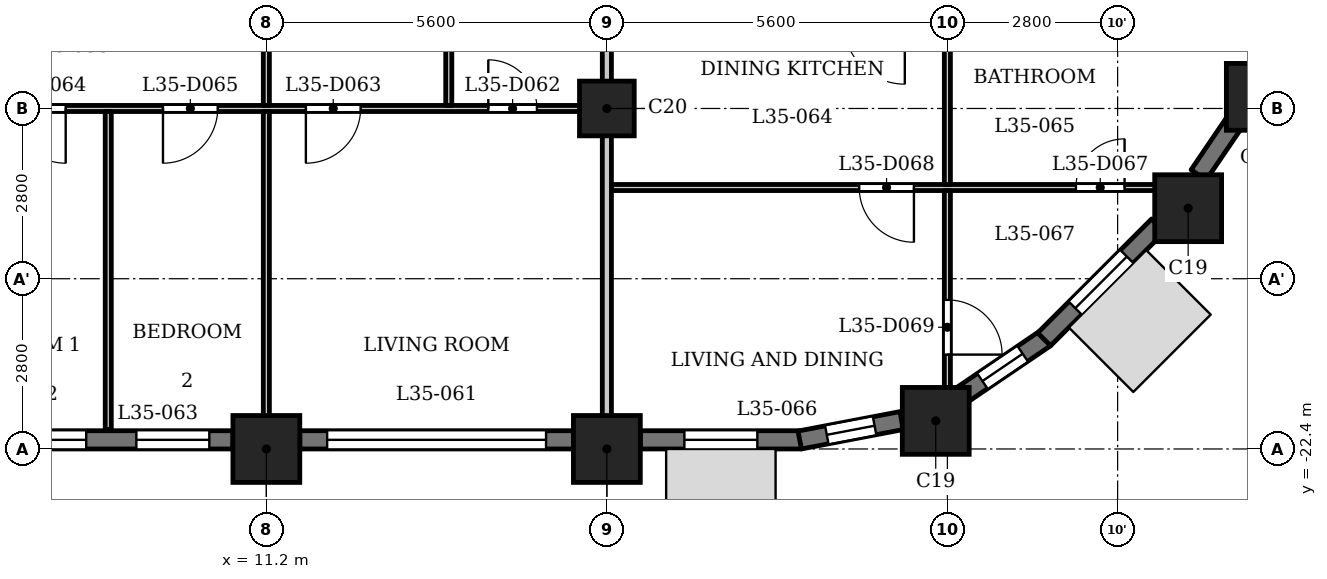
"""IFC4 building model, lengths in metres.
Left out: names, types, materials, properties, quantities, classifications, styles, units other than length and angle.
Written with IfcOpenShell. Run it as: python <this file> out.ifc"""

import sys

from ifc_helpers import new_model, si_unit, direction, frame, frame_2d, origin, origin_2d, place, context, subcontext, project, spatial, rectangle, extrude, element, fill, save


model = new_model("IFC4")
c1 = context("Model", 3, precision=1e-05, world=origin(), true_north=direction((0.0, 1.0)))
c2 = subcontext(c1, "Body", "Model", "MODEL_VIEW")
j1 = project(units=[si_unit("LENGTHUNIT", "METRE"), si_unit("PLANEANGLEUNIT", "RADIAN")], contexts=[c1])
p1 = place(None, origin())
s1 = spatial("IfcSite", under=j1, at=p1, CompositionType="ELEMENT")
p2 = place(p1, origin())
s2 = spatial("IfcBuilding", under=s1, at=p2, CompositionType="ELEMENT")
p3 = place(p2, frame((0.0, 0.0, 139.6)))
s3 = spatial("IfcBuildingStorey", under=s2, at=p3, CompositionType="ELEMENT", Elevation=139.6)
for number, where, z_axis, x_axis in (
    (1, (11.2, -22.4, 0.0), (0.0, 0.0, 1.0), (1.0, 0.0, 0.0)),
    (2, (16.8, -22.4, 0.0), (0.0, 0.0, 1.0), (1.0, 0.0, 0.0)),
    (3, (22.209, -21.938, 0.0), (0.0, 0.0, 1.0), (1.0, 0.0, 0.0)),
    (4, (26.36, -18.44, 0.0), (0.0, 0.0, 1.0), (1.0, 0.0, 0.0)),
    (5, (27.538, -16.609, 0.0), (0.0, 0.0, 1.0), (1.0, 0.0, 0.0)),
):
    element("IfcColumn", number, at=place(p3, frame(where, z_axis=z_axis, x_axis=x_axis)), inside=s3, PredefinedType="COLUMN", context=c2, shape_type="SweptSolid", body=[
        extrude(rectangle(XDim=1.1, YDim=1.1, at=origin_2d()), origin(), (0.0, 0.0, 1.0), 3.5),
    ])
p4 = place(p3, frame((16.8, -16.8, 0.0), z_axis=(0.0, 0.0, 1.0), x_axis=(1.0, 0.0, 0.0)))
e6 = element("IfcColumn", 6, at=p4, inside=s3, PredefinedType="COLUMN", context=c2, shape_type="SweptSolid", body=[
    extrude(rectangle(XDim=0.9, YDim=0.9, at=origin_2d()), origin(), (0.0, 0.0, 1.0), 3.5),
])
p5 = place(p3, frame((6.15, -22.25, 0.0), z_axis=(0.0, 0.0, 1.0), x_axis=(1.0, 0.0, 0.0)))
e7 = element("IfcWall", 7, at=p5, inside=s3, PredefinedType="SOLIDWALL", context=c2, shape_type="SweptSolid", body=[
    extrude(rectangle(XDim=4.5, YDim=0.3, at=frame_2d((2.25, 0.0))), origin(), (0.0, 0.0, 1.0), 2.45),
])
p6 = place(p5, frame((0.288, 0.0, 0.9)))
e8 = element("IfcOpeningElement", 8, at=p6, cuts=e7, PredefinedType="OPENING", context=c2, shape_type="SweptSolid", body=[
    extrude(rectangle(XDim=1.8, YDim=1.25, at=frame_2d((0.9, 0.625))), frame((0.0, 0.16, 0.0), z_axis=(0.0, -1.0, 0.0), x_axis=(1.0, 0.0, 0.0)), (0.0, 0.0, 1.0), 0.32),
])
p7 = place(p5, frame((2.913, 0.0, 0.6)))
e9 = element("IfcOpeningElement", 9, at=p7, cuts=e7, PredefinedType="OPENING", context=c2, shape_type="SweptSolid", body=[
    extrude(rectangle(XDim=1.2, YDim=1.55, at=frame_2d((0.6, 0.775))), frame((0.0, 0.16, 0.0), z_axis=(0.0, -1.0, 0.0), x_axis=(1.0, 0.0, 0.0)), (0.0, 0.0, 1.0), 0.32),
])
p8 = place(p3, frame((11.75, -22.25, 0.0), z_axis=(0.0, 0.0, 1.0), x_axis=(1.0, 0.0, 0.0)))
e10 = element("IfcWall", 10, at=p8, inside=s3, PredefinedType="SOLIDWALL", context=c2, shape_type="SweptSolid", body=[
    extrude(rectangle(XDim=4.5, YDim=0.3, at=frame_2d((2.25, 0.0))), origin(), (0.0, 0.0, 1.0), 2.45),
])
p9 = place(p8, frame((0.45, 0.0, 1.2)))
e11 = element("IfcOpeningElement", 11, at=p9, cuts=e10, PredefinedType="OPENING", context=c2, shape_type="SweptSolid", body=[
    extrude(rectangle(XDim=3.6, YDim=0.95, at=frame_2d((1.8, 0.475))), frame((0.0, 0.16, 0.0), z_axis=(0.0, -1.0, 0.0), x_axis=(1.0, 0.0, 0.0)), (0.0, 0.0, 1.0), 0.32),
])
p10 = place(p3, frame((17.35, -22.25, 0.0), z_axis=(0.0, 0.0, 1.0), x_axis=(1.0, 0.0, 0.0)))
e12 = element("IfcWall", 12, at=p10, inside=s3, PredefinedType="SOLIDWALL", context=c2, shape_type="SweptSolid", body=[
    extrude(rectangle(XDim=2.65, YDim=0.3, at=frame_2d((1.325, 0.0))), origin(), (0.0, 0.0, 1.0), 2.45),
])
p11 = place(p10, frame((0.725, 0.0, 0.6)))
e13 = element("IfcOpeningElement", 13, at=p11, cuts=e12, PredefinedType="OPENING", context=c2, shape_type="SweptSolid", body=[
    extrude(rectangle(XDim=1.2, YDim=1.55, at=frame_2d((0.6, 0.775))), frame((0.0, 0.16, 0.0), z_axis=(0.0, -1.0, 0.0), x_axis=(1.0, 0.0, 0.0)), (0.0, 0.0, 1.0), 0.32),
])
p12 = place(p3, frame((19.972, -22.253, 0.0), z_axis=(0.0, 0.0, 1.0), x_axis=(0.982297206936, 0.187329114784, 0.0)))
e14 = element("IfcWall", 14, at=p12, inside=s3, PredefinedType="SOLIDWALL", context=c2, shape_type="SweptSolid", body=[
    extrude(rectangle(XDim=1.706, YDim=0.3, at=frame_2d((0.853, 0.0))), origin(), (0.0, 0.0, 1.0), 2.45),
])
p13 = place(p12, frame((0.453, 0.0, 0.6)))
e15 = element("IfcOpeningElement", 15, at=p13, cuts=e14, PredefinedType="OPENING", context=c2, shape_type="SweptSolid", body=[
    extrude(rectangle(XDim=0.8, YDim=1.55, at=frame_2d((0.4, 0.775))), frame((0.0, 0.16, 0.0), z_axis=(0.0, -1.0, 0.0), x_axis=(1.0, 0.0, 0.0)), (0.0, 0.0, 1.0), 0.32),
])
p14 = place(p3, frame((22.602, -21.538, 0.0), z_axis=(0.0, 0.0, 1.0), x_axis=(0.827040942766, 0.562141689424, 0.0)))
e16 = element("IfcWall", 16, at=p14, inside=s3, PredefinedType="SOLIDWALL", context=c2, shape_type="SweptSolid", body=[
    extrude(rectangle(XDim=1.706, YDim=0.3, at=frame_2d((0.853, 0.0))), origin(), (0.0, 0.0, 1.0), 2.45),
])
p15 = place(p14, frame((0.453, 0.0, 0.6)))
e17 = element("IfcOpeningElement", 17, at=p15, cuts=e16, PredefinedType="OPENING", context=c2, shape_type="SweptSolid", body=[
    extrude(rectangle(XDim=0.8, YDim=1.55, at=frame_2d((0.4, 0.775))), frame((0.0, 0.16, 0.0), z_axis=(0.0, -1.0, 0.0), x_axis=(1.0, 0.0, 0.0)), (0.0, 0.0, 1.0), 0.32),
])
p16 = place(p3, frame((23.991, -20.597, 0.0), z_axis=(0.0, 0.0, 1.0), x_axis=(0.707106781187, 0.707106781187, 0.0)))
e18 = element("IfcWall", 18, at=p16, inside=s3, PredefinedType="SOLIDWALL", context=c2, shape_type="SweptSolid", body=[
    extrude(rectangle(XDim=2.65, YDim=0.3, at=frame_2d((1.325, 0.0))), origin(), (0.0, 0.0, 1.0), 2.45),
])
p17 = place(p16, frame((0.725, 0.0, 0.6)))
e19 = element("IfcOpeningElement", 19, at=p17, cuts=e18, PredefinedType="OPENING", context=c2, shape_type="SweptSolid", body=[
    extrude(rectangle(XDim=1.2, YDim=1.55, at=frame_2d((0.6, 0.775))), frame((0.0, 0.16, 0.0), z_axis=(0.0, -1.0, 0.0), x_axis=(1.0, 0.0, 0.0)), (0.0, 0.0, 1.0), 0.32),
])
p18 = place(p3, frame((26.532, -17.893, 0.0), z_axis=(0.0, 0.0, 1.0), x_axis=(0.562105419172, 0.82706559458, 0.0)))
e20 = element("IfcWall", 20, at=p18, inside=s3, PredefinedType="SOLIDWALL", context=c2, shape_type="SweptSolid", body=[
    extrude(rectangle(XDim=1.077, YDim=0.3, at=frame_2d((0.539, 0.0))), origin(), (0.0, 0.0, 1.0), 3.2),
])
p19 = place(p3, frame((16.875, -18.1, 0.0), z_axis=(0.0, 0.0, 1.0), x_axis=(1.0, 0.0, 0.0)))
e21 = element("IfcWall", 21, at=p19, inside=s3, PredefinedType="PARTITIONING", context=c2, shape_type="SweptSolid", body=[
    extrude(rectangle(XDim=9.565, YDim=0.1, at=frame_2d((4.782, 0.0))), origin(), (0.0, 0.0, 1.0), 3.2),
])
p20 = place(p19, frame((7.639, 0.0, 0.0)))
e22 = element("IfcOpeningElement", 22, at=p20, cuts=e21, PredefinedType="OPENING", context=c2, shape_type="SweptSolid", body=[
    extrude(rectangle(XDim=0.8, YDim=2.1, at=frame_2d((0.4, 1.05))), frame((0.0, 0.06, 0.0), z_axis=(0.0, -1.0, 0.0), x_axis=(1.0, 0.0, 0.0)), (0.0, 0.0, 1.0), 0.12),
])
p21 = place(p19, frame((4.075, 0.0, 0.0)))
e23 = element("IfcOpeningElement", 23, at=p21, cuts=e21, PredefinedType="OPENING", context=c2, shape_type="SweptSolid", body=[
    extrude(rectangle(XDim=0.9, YDim=2.1, at=frame_2d((0.45, 1.05))), frame((0.0, 0.06, 0.0), z_axis=(0.0, -1.0, 0.0), x_axis=(1.0, 0.0, 0.0)), (0.0, 0.0, 1.0), 0.12),
])
p22 = place(p3, frame((-16.725, -16.8, 0.0), z_axis=(0.0, 0.0, 1.0), x_axis=(1.0, 0.0, 0.0)))
e24 = element("IfcWall", 24, at=p22, inside=s3, PredefinedType="PARTITIONING", context=c2, shape_type="SweptSolid", body=[
    extrude(rectangle(XDim=33.45, YDim=0.1, at=frame_2d((16.725, 0.0))), origin(), (0.0, 0.0, 1.0), 3.2),
])
p23 = place(p22, frame((0.575, 0.0, 0.0)))
e25 = element("IfcOpeningElement", 25, at=p23, cuts=e24, PredefinedType="OPENING", context=c2, shape_type="SweptSolid", body=[
    extrude(rectangle(XDim=0.8, YDim=2.1, at=frame_2d((0.4, 1.05))), frame((0.0, 0.06, 0.0), z_axis=(0.0, -1.0, 0.0), x_axis=(1.0, 0.0, 0.0)), (0.0, 0.0, 1.0), 0.12),
])
p24 = place(p22, frame((6.175, 0.0, 0.0)))
e26 = element("IfcOpeningElement", 26, at=p24, cuts=e24, PredefinedType="OPENING", context=c2, shape_type="SweptSolid", body=[
    extrude(rectangle(XDim=0.9, YDim=2.1, at=frame_2d((0.45, 1.05))), frame((0.0, 0.06, 0.0), z_axis=(0.0, -1.0, 0.0), x_axis=(1.0, 0.0, 0.0)), (0.0, 0.0, 1.0), 0.12),
])
p25 = place(p22, frame((15.275, 0.0, 0.0)))
e27 = element("IfcOpeningElement", 27, at=p25, cuts=e24, PredefinedType="OPENING", context=c2, shape_type="SweptSolid", body=[
    extrude(rectangle(XDim=0.8, YDim=2.1, at=frame_2d((0.4, 1.05))), frame((0.0, 0.06, 0.0), z_axis=(0.0, -1.0, 0.0), x_axis=(1.0, 0.0, 0.0)), (0.0, 0.0, 1.0), 0.12),
])
p26 = place(p22, frame((11.775, 0.0, 0.0)))
e28 = element("IfcOpeningElement", 28, at=p26, cuts=e24, PredefinedType="OPENING", context=c2, shape_type="SweptSolid", body=[
    extrude(rectangle(XDim=0.9, YDim=2.1, at=frame_2d((0.45, 1.05))), frame((0.0, 0.06, 0.0), z_axis=(0.0, -1.0, 0.0), x_axis=(1.0, 0.0, 0.0)), (0.0, 0.0, 1.0), 0.12),
])
p27 = place(p22, frame((17.275, 0.0, 0.0)))
e29 = element("IfcOpeningElement", 29, at=p27, cuts=e24, PredefinedType="OPENING", context=c2, shape_type="SweptSolid", body=[
    extrude(rectangle(XDim=0.8, YDim=2.1, at=frame_2d((0.4, 1.05))), frame((0.0, 0.06, 0.0), z_axis=(0.0, -1.0, 0.0), x_axis=(1.0, 0.0, 0.0)), (0.0, 0.0, 1.0), 0.12),
])
p28 = place(p22, frame((20.775, 0.0, 0.0)))
e30 = element("IfcOpeningElement", 30, at=p28, cuts=e24, PredefinedType="OPENING", context=c2, shape_type="SweptSolid", body=[
    extrude(rectangle(XDim=0.9, YDim=2.1, at=frame_2d((0.45, 1.05))), frame((0.0, 0.06, 0.0), z_axis=(0.0, -1.0, 0.0), x_axis=(1.0, 0.0, 0.0)), (0.0, 0.0, 1.0), 0.12),
])
p29 = place(p22, frame((31.575, 0.0, 0.0)))
e31 = element("IfcOpeningElement", 31, at=p29, cuts=e24, PredefinedType="OPENING", context=c2, shape_type="SweptSolid", body=[
    extrude(rectangle(XDim=0.8, YDim=2.1, at=frame_2d((0.4, 1.05))), frame((0.0, 0.06, 0.0), z_axis=(0.0, -1.0, 0.0), x_axis=(1.0, 0.0, 0.0)), (0.0, 0.0, 1.0), 0.12),
])
p30 = place(p22, frame((28.575, 0.0, 0.0)))
e32 = element("IfcOpeningElement", 32, at=p30, cuts=e24, PredefinedType="OPENING", context=c2, shape_type="SweptSolid", body=[
    extrude(rectangle(XDim=0.9, YDim=2.1, at=frame_2d((0.45, 1.05))), frame((0.0, 0.06, 0.0), z_axis=(0.0, -1.0, 0.0), x_axis=(1.0, 0.0, 0.0)), (0.0, 0.0, 1.0), 0.12),
])
p31 = place(p22, frame((23.725, 0.0, 0.0)))
e33 = element("IfcOpeningElement", 33, at=p31, cuts=e24, PredefinedType="OPENING", context=c2, shape_type="SweptSolid", body=[
    extrude(rectangle(XDim=0.9, YDim=2.1, at=frame_2d((0.45, 1.05))), frame((0.0, 0.06, 0.0), z_axis=(0.0, -1.0, 0.0), x_axis=(1.0, 0.0, 0.0)), (0.0, 0.0, 1.0), 0.12),
])
p32 = place(p22, frame((26.225, 0.0, 0.0)))
e34 = element("IfcOpeningElement", 34, at=p32, cuts=e24, PredefinedType="OPENING", context=c2, shape_type="SweptSolid", body=[
    extrude(rectangle(XDim=0.9, YDim=2.1, at=frame_2d((0.45, 1.05))), frame((0.0, 0.06, 0.0), z_axis=(0.0, -1.0, 0.0), x_axis=(1.0, 0.0, 0.0)), (0.0, 0.0, 1.0), 0.12),
])
p33 = place(p3, frame((8.6, -22.08, 0.0), z_axis=(0.0, 0.0, 1.0), x_axis=(0.0, 1.0, 0.0)))
e35 = element("IfcWall", 35, at=p33, inside=s3, PredefinedType="PARTITIONING", context=c2, shape_type="SweptSolid", body=[
    extrude(rectangle(XDim=5.23, YDim=0.1, at=frame_2d((2.615, 0.0))), origin(), (0.0, 0.0, 1.0), 3.2),
])
p34 = place(p3, frame((11.2, -22.93, 0.0), z_axis=(0.0, 0.0, 1.0), x_axis=(0.0, 1.0, 0.0)))
e36 = element("IfcWall", 36, at=p34, inside=s3, PredefinedType="PARTITIONING", context=c2, shape_type="SweptSolid", body=[
    extrude(rectangle(XDim=6.08, YDim=0.1, at=frame_2d((3.04, 0.0))), origin(), (0.0, 0.0, 1.0), 3.2),
])
p35 = place(p3, frame((11.2, -16.75, 0.0), z_axis=(0.0, 0.0, 1.0), x_axis=(0.0, 1.0, 0.0)))
e37 = element("IfcWall", 37, at=p35, inside=s3, PredefinedType="PARTITIONING", context=c2, shape_type="SweptSolid", body=[
    extrude(rectangle(XDim=3.475, YDim=0.1, at=frame_2d((1.738, 0.0))), origin(), (0.0, 0.0, 1.0), 3.2),
])
p36 = place(p35, frame((2.1, 0.0, 0.0)))
e38 = element("IfcOpeningElement", 38, at=p36, cuts=e37, PredefinedType="OPENING", context=c2, shape_type="SweptSolid", body=[
    extrude(rectangle(XDim=0.9, YDim=2.1, at=frame_2d((0.45, 1.05))), frame((0.0, 0.06, 0.0), z_axis=(0.0, -1.0, 0.0), x_axis=(1.0, 0.0, 0.0)), (0.0, 0.0, 1.0), 0.12),
])
p37 = place(p3, frame((14.2, -16.75, 0.0), z_axis=(0.0, 0.0, 1.0), x_axis=(0.0, 1.0, 0.0)))
e39 = element("IfcWall", 39, at=p37, inside=s3, PredefinedType="PARTITIONING", context=c2, shape_type="SweptSolid", body=[
    extrude(rectangle(XDim=3.475, YDim=0.1, at=frame_2d((1.738, 0.0))), origin(), (0.0, 0.0, 1.0), 3.2),
])
p38 = place(p3, frame((16.8, -22.93, 0.0), z_axis=(0.0, 0.0, 1.0), x_axis=(0.0, 1.0, 0.0)))
e40 = element("IfcWall", 40, at=p38, inside=s3, PredefinedType="PARTITIONING", context=c2, shape_type="SweptSolid", body=[
    extrude(rectangle(XDim=7.455, YDim=0.15, at=frame_2d((3.728, 0.0))), origin(), (0.0, 0.0, 1.0), 3.2),
])
p39 = place(p3, frame((22.4, -21.72, 0.0), z_axis=(0.0, 0.0, 1.0), x_axis=(0.0, 1.0, 0.0)))
e41 = element("IfcWall", 41, at=p39, inside=s3, PredefinedType="PARTITIONING", context=c2, shape_type="SweptSolid", body=[
    extrude(rectangle(XDim=3.57, YDim=0.1, at=frame_2d((1.785, 0.0))), origin(), (0.0, 0.0, 1.0), 3.2),
])
p40 = place(p39, frame((0.872, 0.0, 0.0)))
e42 = element("IfcOpeningElement", 42, at=p40, cuts=e41, PredefinedType="OPENING", context=c2, shape_type="SweptSolid", body=[
    extrude(rectangle(XDim=0.9, YDim=2.1, at=frame_2d((0.45, 1.05))), frame((0.0, 0.06, 0.0), z_axis=(0.0, -1.0, 0.0), x_axis=(1.0, 0.0, 0.0)), (0.0, 0.0, 1.0), 0.12),
])
p41 = place(p3, frame((22.4, -18.05, 0.0), z_axis=(0.0, 0.0, 1.0), x_axis=(0.0, 1.0, 0.0)))
e43 = element("IfcWall", 43, at=p41, inside=s3, PredefinedType="PARTITIONING", context=c2, shape_type="SweptSolid", body=[
    extrude(rectangle(XDim=2.575, YDim=0.1, at=frame_2d((1.288, 0.0))), origin(), (0.0, 0.0, 1.0), 3.2),
])
p42 = place(p29, origin())
e44 = element("IfcDoor", 44, at=p42, inside=s3, OperationType="SINGLE_SWING_RIGHT", PredefinedType="DOOR", context=c2, shape_type="SweptSolid", body=[
    extrude(rectangle(XDim=0.8, YDim=2.1, at=frame_2d((0.4, 1.05))), frame((0.0, 0.025, 0.0), z_axis=(0.0, -1.0, 0.0), x_axis=(1.0, 0.0, 0.0)), (0.0, 0.0, 1.0), 0.05),
])
fill(e31, e44)
p43 = place(p30, origin())
e45 = element("IfcDoor", 45, at=p43, inside=s3, OperationType="SINGLE_SWING_LEFT", PredefinedType="DOOR", context=c2, shape_type="SweptSolid", body=[
    extrude(rectangle(XDim=0.9, YDim=2.1, at=frame_2d((0.45, 1.05))), frame((0.0, 0.025, 0.0), z_axis=(0.0, -1.0, 0.0), x_axis=(1.0, 0.0, 0.0)), (0.0, 0.0, 1.0), 0.05),
])
fill(e32, e45)
p44 = place(p31, origin())
e46 = element("IfcDoor", 46, at=p44, inside=s3, OperationType="SINGLE_SWING_RIGHT", PredefinedType="DOOR", context=c2, shape_type="SweptSolid", body=[
    extrude(rectangle(XDim=0.9, YDim=2.1, at=frame_2d((0.45, 1.05))), frame((0.0, 0.025, 0.0), z_axis=(0.0, -1.0, 0.0), x_axis=(1.0, 0.0, 0.0)), (0.0, 0.0, 1.0), 0.05),
])
fill(e33, e46)
p45 = place(p32, origin())
e47 = element("IfcDoor", 47, at=p45, inside=s3, OperationType="SINGLE_SWING_LEFT", PredefinedType="DOOR", context=c2, shape_type="SweptSolid", body=[
    extrude(rectangle(XDim=0.9, YDim=2.1, at=frame_2d((0.45, 1.05))), frame((0.0, 0.025, 0.0), z_axis=(0.0, -1.0, 0.0), x_axis=(1.0, 0.0, 0.0)), (0.0, 0.0, 1.0), 0.05),
])
fill(e34, e47)
p46 = place(p20, origin())
e48 = element("IfcDoor", 48, at=p46, inside=s3, OperationType="SINGLE_SWING_LEFT", PredefinedType="DOOR", context=c2, shape_type="SweptSolid", body=[
    extrude(rectangle(XDim=0.8, YDim=2.1, at=frame_2d((0.4, 1.05))), frame((0.0, 0.025, 0.0), z_axis=(0.0, -1.0, 0.0), x_axis=(1.0, 0.0, 0.0)), (0.0, 0.0, 1.0), 0.05),
])
fill(e22, e48)
p47 = place(p21, origin())
e49 = element("IfcDoor", 49, at=p47, inside=s3, OperationType="SINGLE_SWING_RIGHT", PredefinedType="DOOR", context=c2, shape_type="SweptSolid", body=[
    extrude(rectangle(XDim=0.9, YDim=2.1, at=frame_2d((0.45, 1.05))), frame((0.0, 0.025, 0.0), z_axis=(0.0, -1.0, 0.0), x_axis=(1.0, 0.0, 0.0)), (0.0, 0.0, 1.0), 0.05),
])
fill(e23, e49)
p48 = place(p40, origin())
e50 = element("IfcDoor", 50, at=p48, inside=s3, OperationType="SINGLE_SWING_LEFT", PredefinedType="DOOR", context=c2, shape_type="SweptSolid", body=[
    extrude(rectangle(XDim=0.9, YDim=2.1, at=frame_2d((0.45, 1.05))), frame((0.0, 0.025, 0.0), z_axis=(0.0, -1.0, 0.0), x_axis=(1.0, 0.0, 0.0)), (0.0, 0.0, 1.0), 0.05),
])
fill(e42, e50)
p49 = place(p6, origin())
e51 = element("IfcWindow", 51, at=p49, inside=s3, PartitioningType="SINGLE_PANEL", PredefinedType="WINDOW", context=c2, shape_type="SweptSolid", body=[
    extrude(rectangle(XDim=1.8, YDim=1.25, at=frame_2d((0.9, 0.625))), frame((0.0, 0.03, 0.0), z_axis=(0.0, -1.0, 0.0), x_axis=(1.0, 0.0, 0.0)), (0.0, 0.0, 1.0), 0.06),
])
fill(e8, e51)
p50 = place(p7, origin())
e52 = element("IfcWindow", 52, at=p50, inside=s3, PartitioningType="SINGLE_PANEL", PredefinedType="WINDOW", context=c2, shape_type="SweptSolid", body=[
    extrude(rectangle(XDim=1.2, YDim=1.55, at=frame_2d((0.6, 0.775))), frame((0.0, 0.03, 0.0), z_axis=(0.0, -1.0, 0.0), x_axis=(1.0, 0.0, 0.0)), (0.0, 0.0, 1.0), 0.06),
])
fill(e9, e52)
p51 = place(p9, origin())
e53 = element("IfcWindow", 53, at=p51, inside=s3, PartitioningType="SINGLE_PANEL", PredefinedType="WINDOW", context=c2, shape_type="SweptSolid", body=[
    extrude(rectangle(XDim=3.6, YDim=0.95, at=frame_2d((1.8, 0.475))), frame((0.0, 0.03, 0.0), z_axis=(0.0, -1.0, 0.0), x_axis=(1.0, 0.0, 0.0)), (0.0, 0.0, 1.0), 0.06),
])
fill(e11, e53)
p52 = place(p11, origin())
e54 = element("IfcWindow", 54, at=p52, inside=s3, PartitioningType="SINGLE_PANEL", PredefinedType="WINDOW", context=c2, shape_type="SweptSolid", body=[
    extrude(rectangle(XDim=1.2, YDim=1.55, at=frame_2d((0.6, 0.775))), frame((0.0, 0.03, 0.0), z_axis=(0.0, -1.0, 0.0), x_axis=(1.0, 0.0, 0.0)), (0.0, 0.0, 1.0), 0.06),
])
fill(e13, e54)
p53 = place(p13, origin())
e55 = element("IfcWindow", 55, at=p53, inside=s3, PartitioningType="SINGLE_PANEL", PredefinedType="WINDOW", context=c2, shape_type="SweptSolid", body=[
    extrude(rectangle(XDim=0.8, YDim=1.55, at=frame_2d((0.4, 0.775))), frame((0.0, 0.03, 0.0), z_axis=(0.0, -1.0, 0.0), x_axis=(1.0, 0.0, 0.0)), (0.0, 0.0, 1.0), 0.06),
])
fill(e15, e55)
p54 = place(p15, origin())
e56 = element("IfcWindow", 56, at=p54, inside=s3, PartitioningType="SINGLE_PANEL", PredefinedType="WINDOW", context=c2, shape_type="SweptSolid", body=[
    extrude(rectangle(XDim=0.8, YDim=1.55, at=frame_2d((0.4, 0.775))), frame((0.0, 0.03, 0.0), z_axis=(0.0, -1.0, 0.0), x_axis=(1.0, 0.0, 0.0)), (0.0, 0.0, 1.0), 0.06),
])
fill(e17, e56)
p55 = place(p17, origin())
e57 = element("IfcWindow", 57, at=p55, inside=s3, PartitioningType="SINGLE_PANEL", PredefinedType="WINDOW", context=c2, shape_type="SweptSolid", body=[
    extrude(rectangle(XDim=1.2, YDim=1.55, at=frame_2d((0.6, 0.775))), frame((0.0, 0.03, 0.0), z_axis=(0.0, -1.0, 0.0), x_axis=(1.0, 0.0, 0.0)), (0.0, 0.0, 1.0), 0.06),
])
fill(e19, e57)
save(model, sys.argv[1])
